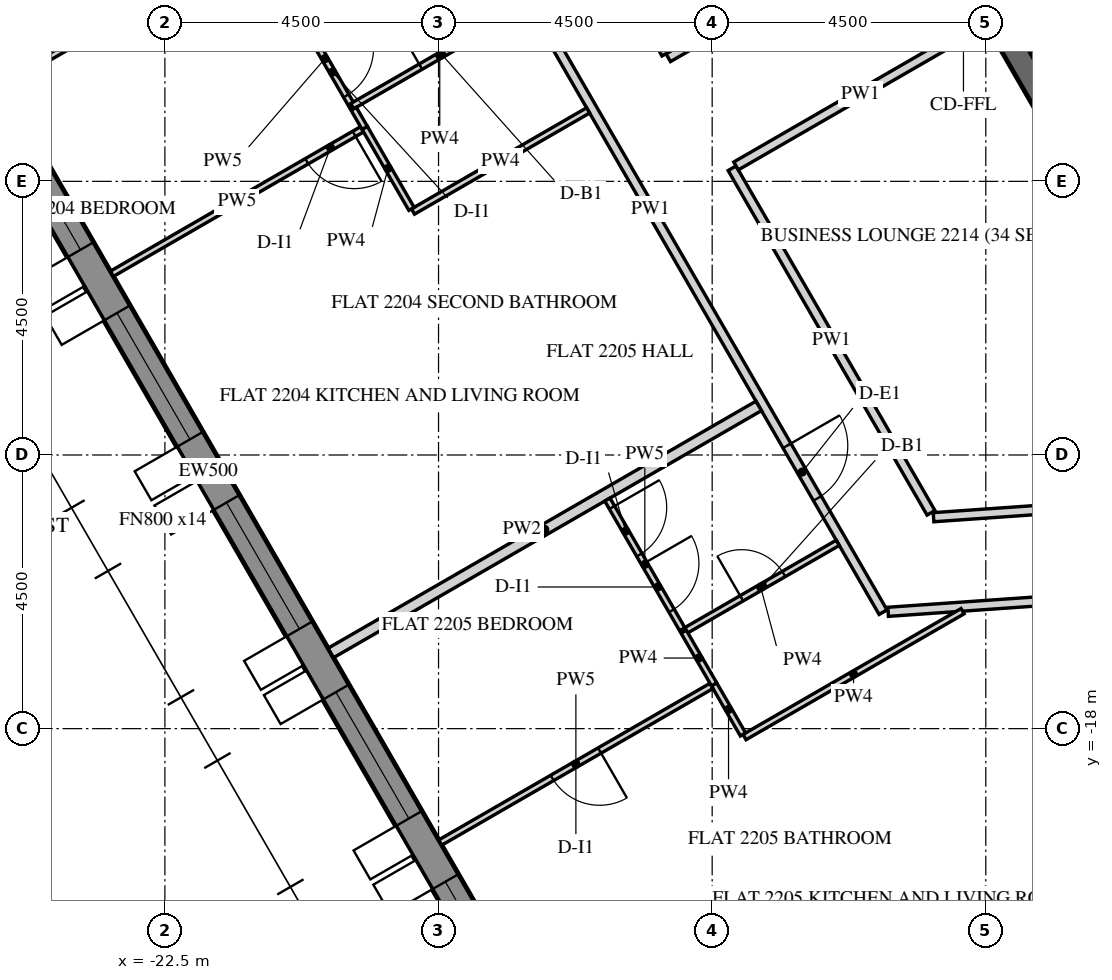
"""IFC4 building model, lengths in metres.
Left out: names, types, materials, properties, quantities, classifications, styles, units other than length and angle.
Written with IfcOpenShell. Run it as: python <this file> out.ifc"""

import sys

from ifc_helpers import new_model, si_unit, direction, frame, frame_2d, origin, place, context, subcontext, project, spatial, polyline, rectangle, outline, extrude, element, fill, save


model = new_model("IFC4")
c1 = context("Model", 3, precision=1e-05, world=origin(), true_north=direction((0.0, 1.0)))
c2 = subcontext(c1, "Body", "Model", "MODEL_VIEW")
j1 = project(units=[si_unit("LENGTHUNIT", "METRE"), si_unit("PLANEANGLEUNIT", "RADIAN")], contexts=[c1])
p1 = place(None, origin())
s1 = spatial("IfcSite", under=j1, at=p1, CompositionType="ELEMENT")
p2 = place(p1, origin())
s2 = spatial("IfcBuilding", under=s1, at=p2, CompositionType="ELEMENT")
p3 = place(p2, frame((0.0, 0.0, 279.6)))
s3 = spatial("IfcBuildingStorey", under=s2, at=p3, CompositionType="ELEMENT", Elevation=279.6)
p4 = place(p3, frame((-28.149, -2.745, -0.15), z_axis=(0.0, 0.0, 1.0), x_axis=(0.500003737743, -0.866023245787, 0.0)))
e1 = element("IfcWall", 1, at=p4, inside=s3, PredefinedType="SOLIDWALL", context=c2, shape_type="SweptSolid", body=[
    extrude(outline(polyline([(-0.021, -0.25), (25.468, -0.25), (25.421, 0.25), (0.021, 0.25), (-0.021, -0.25)])), origin(), (0.0, 0.0, 1.0), 3.9),
])
p5 = place(p4, frame((2.522, 0.0, 0.75)))
e2 = element("IfcOpeningElement", 2, at=p5, cuts=e1, PredefinedType="OPENING", context=c2, shape_type="SweptSolid", body=[
    extrude(rectangle(XDim=2.4, YDim=2.7, at=frame_2d((1.2, 1.35))), frame((0.0, 0.26, 0.0), z_axis=(0.0, -1.0, 0.0), x_axis=(1.0, 0.0, 0.0)), (0.0, 0.0, 1.0), 0.52),
])
p6 = place(p4, frame((6.122, 0.0, 0.75)))
e3 = element("IfcOpeningElement", 3, at=p6, cuts=e1, PredefinedType="OPENING", context=c2, shape_type="SweptSolid", body=[
    extrude(rectangle(XDim=2.4, YDim=2.7, at=frame_2d((1.2, 1.35))), frame((0.0, 0.26, 0.0), z_axis=(0.0, -1.0, 0.0), x_axis=(1.0, 0.0, 0.0)), (0.0, 0.0, 1.0), 0.52),
])
p7 = place(p4, frame((9.722, 0.0, 0.75)))
e4 = element("IfcOpeningElement", 4, at=p7, cuts=e1, PredefinedType="OPENING", context=c2, shape_type="SweptSolid", body=[
    extrude(rectangle(XDim=2.4, YDim=2.7, at=frame_2d((1.2, 1.35))), frame((0.0, 0.26, 0.0), z_axis=(0.0, -1.0, 0.0), x_axis=(1.0, 0.0, 0.0)), (0.0, 0.0, 1.0), 0.52),
])
p8 = place(p4, frame((13.323, 0.0, 0.75)))
e5 = element("IfcOpeningElement", 5, at=p8, cuts=e1, PredefinedType="OPENING", context=c2, shape_type="SweptSolid", body=[
    extrude(rectangle(XDim=2.4, YDim=2.7, at=frame_2d((1.2, 1.35))), frame((0.0, 0.26, 0.0), z_axis=(0.0, -1.0, 0.0), x_axis=(1.0, 0.0, 0.0)), (0.0, 0.0, 1.0), 0.52),
])
p9 = place(p4, frame((16.922, 0.0, 0.75)))
e6 = element("IfcOpeningElement", 6, at=p9, cuts=e1, PredefinedType="OPENING", context=c2, shape_type="SweptSolid", body=[
    extrude(rectangle(XDim=2.4, YDim=2.7, at=frame_2d((1.2, 1.35))), frame((0.0, 0.26, 0.0), z_axis=(0.0, -1.0, 0.0), x_axis=(1.0, 0.0, 0.0)), (0.0, 0.0, 1.0), 0.52),
])
p10 = place(p4, frame((20.522, 0.0, 0.75)))
e7 = element("IfcOpeningElement", 7, at=p10, cuts=e1, PredefinedType="OPENING", context=c2, shape_type="SweptSolid", body=[
    extrude(rectangle(XDim=2.4, YDim=2.7, at=frame_2d((1.2, 1.35))), frame((0.0, 0.26, 0.0), z_axis=(0.0, -1.0, 0.0), x_axis=(1.0, 0.0, 0.0)), (0.0, 0.0, 1.0), 0.52),
])
p11 = place(p3, frame((-12.471, 0.0, -0.15), z_axis=(0.0, 0.0, 1.0), x_axis=(0.499996419489, -0.866027470984, 0.0)))
e8 = element("IfcWall", 8, at=p11, inside=s3, PredefinedType="SHEAR", context=c2, shape_type="SweptSolid", body=[
    extrude(outline(polyline([(-0.115, -0.2), (12.586, -0.2), (12.355, 0.2), (0.115, 0.2), (-0.115, -0.2)])), origin(), (0.0, 0.0, 1.0), 3.9),
])
p12 = place(p11, frame((5.306, 0.0, 0.15)))
e9 = element("IfcOpeningElement", 9, at=p12, cuts=e8, PredefinedType="OPENING", context=c2, shape_type="SweptSolid", body=[
    extrude(rectangle(XDim=1.8, YDim=2.4, at=frame_2d((0.9, 1.2))), frame((0.0, 0.21, 0.0), z_axis=(0.0, -1.0, 0.0), x_axis=(1.0, 0.0, 0.0)), (0.0, 0.0, 1.0), 0.42),
])
p13 = place(p3, frame((-18.338, -2.838, 0.0), z_axis=(0.0, 0.0, 1.0), x_axis=(0.499999693481, -0.866025580753, 0.0)))
e10 = element("IfcWall", 10, at=p13, inside=s3, PredefinedType="PARTITIONING", context=c2, shape_type="SweptSolid", body=[
    extrude(rectangle(XDim=15.296, YDim=0.15, at=frame_2d((7.648, 0.0))), origin(), (0.0, 0.0, 1.0), 2.988),
])
p14 = place(p13, frame((2.325, 0.0, 0.0)))
e11 = element("IfcOpeningElement", 11, at=p14, cuts=e10, PredefinedType="OPENING", context=c2, shape_type="SweptSolid", body=[
    extrude(rectangle(XDim=1.0, YDim=2.1, at=frame_2d((0.5, 1.05))), frame((0.0, 0.085, 0.0), z_axis=(0.0, -1.0, 0.0), x_axis=(1.0, 0.0, 0.0)), (0.0, 0.0, 1.0), 0.17),
])
p15 = place(p13, frame((12.136, 0.0, 0.0)))
e12 = element("IfcOpeningElement", 12, at=p15, cuts=e10, PredefinedType="OPENING", context=c2, shape_type="SweptSolid", body=[
    extrude(rectangle(XDim=1.0, YDim=2.1, at=frame_2d((0.5, 1.05))), frame((0.0, 0.085, 0.0), z_axis=(0.0, -1.0, 0.0), x_axis=(1.0, 0.0, 0.0)), (0.0, 0.0, 1.0), 0.17),
])
p16 = place(p3, frame((-10.606, -16.079, 0.0), z_axis=(0.0, 0.0, 1.0), x_axis=(0.997563356349, 0.069766396426, 0.0)))
e13 = element("IfcWall", 13, at=p16, inside=s3, PredefinedType="PARTITIONING", context=c2, shape_type="SweptSolid", body=[
    extrude(rectangle(XDim=17.273, YDim=0.15, at=frame_2d((8.636, 0.0))), origin(), (0.0, 0.0, 1.0), 2.988),
])
p17 = place(p16, frame((3.877, 0.0, 0.0)))
e14 = element("IfcOpeningElement", 14, at=p17, cuts=e13, PredefinedType="OPENING", context=c2, shape_type="SweptSolid", body=[
    extrude(rectangle(XDim=1.0, YDim=2.1, at=frame_2d((0.5, 1.05))), frame((0.0, 0.085, 0.0), z_axis=(0.0, -1.0, 0.0), x_axis=(1.0, 0.0, 0.0)), (0.0, 0.0, 1.0), 0.17),
])
p18 = place(p3, frame((-10.066, -4.566, 0.0), z_axis=(0.0, 0.0, 1.0), x_axis=(-0.866037363387, -0.499979284789, 0.0)))
e15 = element("IfcWall", 15, at=p18, inside=s3, PredefinedType="PARTITIONING", context=c2, shape_type="SweptSolid", body=[
    extrude(rectangle(XDim=4.8, YDim=0.15, at=frame_2d((2.4, 0.0))), origin(), (0.0, 0.0, 1.0), 2.988),
])
p19 = place(p3, frame((-14.26, -6.901, 0.0), z_axis=(0.0, 0.0, 1.0), x_axis=(-0.499978899972, 0.866037585549, 0.0)))
e16 = element("IfcWall", 16, at=p19, inside=s3, PredefinedType="PARTITIONING", context=c2, shape_type="SweptSolid", body=[
    extrude(rectangle(XDim=4.835, YDim=0.15, at=frame_2d((2.417, 0.0))), origin(), (0.0, 0.0, 1.0), 2.988),
])
p20 = place(p19, frame((1.967, 0.0, 0.0)))
e17 = element("IfcOpeningElement", 17, at=p20, cuts=e16, PredefinedType="OPENING", context=c2, shape_type="SweptSolid", body=[
    extrude(rectangle(XDim=0.9, YDim=2.1, at=frame_2d((0.45, 1.05))), frame((0.0, 0.085, 0.0), z_axis=(0.0, -1.0, 0.0), x_axis=(1.0, 0.0, 0.0)), (0.0, 0.0, 1.0), 0.17),
])
p21 = place(p3, frame((7.051, -13.341, 0.0), z_axis=(0.0, 0.0, 1.0), x_axis=(-0.997563599815, -0.069762915103, 0.0)))
e18 = element("IfcWall", 18, at=p21, inside=s3, PredefinedType="PARTITIONING", context=c2, shape_type="SweptSolid", body=[
    extrude(rectangle(XDim=16.952, YDim=0.15, at=frame_2d((8.476, 0.0))), origin(), (0.0, 0.0, 1.0), 2.988),
])
p22 = place(p21, frame((8.026, 0.0, 0.0)))
e19 = element("IfcOpeningElement", 19, at=p22, cuts=e18, PredefinedType="OPENING", context=c2, shape_type="SweptSolid", body=[
    extrude(rectangle(XDim=0.9, YDim=2.1, at=frame_2d((0.45, 1.05))), frame((0.0, 0.085, 0.0), z_axis=(0.0, -1.0, 0.0), x_axis=(1.0, 0.0, 0.0)), (0.0, 0.0, 1.0), 0.17),
])
p23 = place(p3, frame((-9.901, -14.451, 0.0), z_axis=(0.0, 0.0, 1.0), x_axis=(-0.49999161165, 0.866030246746, 0.0)))
e20 = element("IfcWall", 20, at=p23, inside=s3, PredefinedType="PARTITIONING", context=c2, shape_type="SweptSolid", body=[
    extrude(rectangle(XDim=6.543, YDim=0.15, at=frame_2d((3.271, 0.0))), origin(), (0.0, 0.0, 1.0), 2.988),
])
p24 = place(p3, frame((-13.108, -8.747, 0.0), z_axis=(0.0, 0.0, 1.0), x_axis=(0.866024684746, 0.500001245408, 0.0)))
e21 = element("IfcWall", 21, at=p24, inside=s3, PredefinedType="PARTITIONING", context=c2, shape_type="SweptSolid", body=[
    extrude(rectangle(XDim=4.725, YDim=0.15, at=frame_2d((2.363, 0.0))), origin(), (0.0, 0.0, 1.0), 2.988),
])
p25 = place(p3, frame((-19.258, -8.145, 0.0), z_axis=(0.0, 0.0, 1.0), x_axis=(-0.866033238375, -0.499986429846, 0.0)))
e22 = element("IfcWall", 22, at=p25, inside=s3, PredefinedType="PARTITIONING", context=c2, shape_type="SweptSolid", body=[
    extrude(rectangle(XDim=4.75, YDim=0.1, at=frame_2d((2.375, 0.0))), origin(), (0.0, 0.0, 1.0), 2.988),
])
p26 = place(p25, frame((0.15, 0.0, 0.0)))
e23 = element("IfcOpeningElement", 23, at=p26, cuts=e22, PredefinedType="OPENING", context=c2, shape_type="SweptSolid", body=[
    extrude(rectangle(XDim=0.9, YDim=2.1, at=frame_2d((0.45, 1.05))), frame((0.0, 0.06, 0.0), z_axis=(0.0, -1.0, 0.0), x_axis=(1.0, 0.0, 0.0)), (0.0, 0.0, 1.0), 0.12),
])
p27 = place(p3, frame((-15.54, -7.833, 0.0), z_axis=(0.0, 0.0, 1.0), x_axis=(-0.866020521143, -0.500008456887, 0.0)))
e24 = element("IfcWall", 24, at=p27, inside=s3, PredefinedType="PARTITIONING", context=c2, shape_type="SweptSolid", body=[
    extrude(rectangle(XDim=3.325, YDim=0.1, at=frame_2d((1.663, 0.0))), origin(), (0.0, 0.0, 1.0), 2.988),
])
p28 = place(p3, frame((-18.445, -9.453, 0.0), z_axis=(0.0, 0.0, 1.0), x_axis=(-0.500024172624, 0.866011447264, 0.0)))
e25 = element("IfcWall", 25, at=p28, inside=s3, PredefinedType="PARTITIONING", context=c2, shape_type="SweptSolid", body=[
    extrude(rectangle(XDim=1.541, YDim=0.1, at=frame_2d((0.771, 0.0))), origin(), (0.0, 0.0, 1.0), 2.988),
])
p29 = place(p3, frame((-19.771, -16.755, 0.0), z_axis=(0.0, 0.0, 1.0), x_axis=(0.866022959057, 0.500004234368, 0.0)))
e26 = element("IfcWall", 26, at=p29, inside=s3, PredefinedType="PARTITIONING", context=c2, shape_type="SweptSolid", body=[
    extrude(rectangle(XDim=8.125, YDim=0.18, at=frame_2d((4.062, 0.0))), origin(), (0.0, 0.0, 1.0), 2.988),
])
p30 = place(p3, frame((-20.321, -6.203, 0.0), z_axis=(0.0, 0.0, 1.0), x_axis=(0.500054364951, -0.86599401389, 0.0)))
e27 = element("IfcWall", 27, at=p30, inside=s3, PredefinedType="PARTITIONING", context=c2, shape_type="SweptSolid", body=[
    extrude(rectangle(XDim=1.804, YDim=0.1, at=frame_2d((0.902, 0.0))), origin(), (0.0, 0.0, 1.0), 2.988),
])
p31 = place(p30, frame((0.704, 0.0, 0.0)))
e28 = element("IfcOpeningElement", 28, at=p31, cuts=e27, PredefinedType="OPENING", context=c2, shape_type="SweptSolid", body=[
    extrude(rectangle(XDim=0.9, YDim=2.1, at=frame_2d((0.45, 1.05))), frame((0.0, 0.06, 0.0), z_axis=(0.0, -1.0, 0.0), x_axis=(1.0, 0.0, 0.0)), (0.0, 0.0, 1.0), 0.12),
])
p32 = place(p3, frame((-19.42, -7.764, 0.0), z_axis=(0.0, 0.0, 1.0), x_axis=(0.866002163101, 0.500040251884, 0.0)))
e29 = element("IfcWall", 29, at=p32, inside=s3, PredefinedType="PARTITIONING", context=c2, shape_type="SweptSolid", body=[
    extrude(rectangle(XDim=3.325, YDim=0.1, at=frame_2d((1.663, 0.0))), origin(), (0.0, 0.0, 1.0), 2.988),
])
p33 = place(p32, frame((1.3, 0.0, 0.0)))
e30 = element("IfcOpeningElement", 30, at=p33, cuts=e29, PredefinedType="OPENING", context=c2, shape_type="SweptSolid", body=[
    extrude(rectangle(XDim=0.8, YDim=2.1, at=frame_2d((0.4, 1.05))), frame((0.0, 0.06, 0.0), z_axis=(0.0, -1.0, 0.0), x_axis=(1.0, 0.0, 0.0)), (0.0, 0.0, 1.0), 0.12),
])
p34 = place(p3, frame((-25.171, -7.402, 0.0), z_axis=(0.0, 0.0, 1.0), x_axis=(0.866020389056, 0.500008685663, 0.0)))
e31 = element("IfcWall", 31, at=p34, inside=s3, PredefinedType="PARTITIONING", context=c2, shape_type="SweptSolid", body=[
    extrude(rectangle(XDim=4.75, YDim=0.1, at=frame_2d((2.375, 0.0))), origin(), (0.0, 0.0, 1.0), 2.988),
])
p35 = place(p34, frame((3.7, 0.0, 0.0)))
e32 = element("IfcOpeningElement", 32, at=p35, cuts=e31, PredefinedType="OPENING", context=c2, shape_type="SweptSolid", body=[
    extrude(rectangle(XDim=0.9, YDim=2.1, at=frame_2d((0.45, 1.05))), frame((0.0, 0.06, 0.0), z_axis=(0.0, -1.0, 0.0), x_axis=(1.0, 0.0, 0.0)), (0.0, 0.0, 1.0), 0.12),
])
p36 = place(p3, frame((-19.213, -8.122, 0.0), z_axis=(0.0, 0.0, 1.0), x_axis=(-0.499683639304, 0.866207977689, 0.0)))
e33 = element("IfcWall", 33, at=p36, inside=s3, PredefinedType="PARTITIONING", context=c2, shape_type="SweptSolid", body=[
    extrude(rectangle(XDim=0.363, YDim=0.1, at=frame_2d((0.182, 0.0))), origin(), (0.0, 0.0, 1.0), 2.988),
])
p37 = place(p3, frame((-9.382, -16.069, 0.0), z_axis=(0.0, 0.0, 1.0), x_axis=(-0.866028486751, -0.499994660107, 0.0)))
e34 = element("IfcWall", 34, at=p37, inside=s3, PredefinedType="PARTITIONING", context=c2, shape_type="SweptSolid", body=[
    extrude(rectangle(XDim=4.141, YDim=0.1, at=frame_2d((2.07, 0.0))), origin(), (0.0, 0.0, 1.0), 2.988),
])
p38 = place(p3, frame((-12.993, -18.096, 0.0), z_axis=(0.0, 0.0, 1.0), x_axis=(-0.500055416838, 0.865993406494, 0.0)))
e35 = element("IfcWall", 35, at=p38, inside=s3, PredefinedType="PARTITIONING", context=c2, shape_type="SweptSolid", body=[
    extrude(rectangle(XDim=0.952, YDim=0.1, at=frame_2d((0.476, 0.0))), origin(), (0.0, 0.0, 1.0), 2.988),
])
p39 = place(p3, frame((-13.511, -17.298, 0.0), z_axis=(0.0, 0.0, 1.0), x_axis=(-0.866026116456, -0.499998765615, 0.0)))
e36 = element("IfcWall", 36, at=p39, inside=s3, PredefinedType="PARTITIONING", context=c2, shape_type="SweptSolid", body=[
    extrude(rectangle(XDim=5.15, YDim=0.1, at=frame_2d((2.575, 0.0))), origin(), (0.0, 0.0, 1.0), 2.988),
])
p40 = place(p39, frame((2.125, 0.0, 0.0)))
e37 = element("IfcOpeningElement", 37, at=p40, cuts=e36, PredefinedType="OPENING", context=c2, shape_type="SweptSolid", body=[
    extrude(rectangle(XDim=0.9, YDim=2.1, at=frame_2d((0.45, 1.05))), frame((0.0, 0.06, 0.0), z_axis=(0.0, -1.0, 0.0), x_axis=(1.0, 0.0, 0.0)), (0.0, 0.0, 1.0), 0.12),
])
p41 = place(p3, frame((-13.968, -16.407, 0.0), z_axis=(0.0, 0.0, 1.0), x_axis=(0.866046596414, 0.499963291492, 0.0)))
e38 = element("IfcWall", 38, at=p41, inside=s3, PredefinedType="PARTITIONING", context=c2, shape_type="SweptSolid", body=[
    extrude(rectangle(XDim=2.925, YDim=0.1, at=frame_2d((1.462, 0.0))), origin(), (0.0, 0.0, 1.0), 2.988),
])
p42 = place(p41, frame((1.1, 0.0, 0.0)))
e39 = element("IfcOpeningElement", 39, at=p42, cuts=e38, PredefinedType="OPENING", context=c2, shape_type="SweptSolid", body=[
    extrude(rectangle(XDim=0.8, YDim=2.1, at=frame_2d((0.4, 1.05))), frame((0.0, 0.06, 0.0), z_axis=(0.0, -1.0, 0.0), x_axis=(1.0, 0.0, 0.0)), (0.0, 0.0, 1.0), 0.12),
])
p43 = place(p3, frame((-15.223, -14.233, 0.0), z_axis=(0.0, 0.0, 1.0), x_axis=(0.500000007376, -0.866025399526, 0.0)))
e40 = element("IfcWall", 40, at=p43, inside=s3, PredefinedType="PARTITIONING", context=c2, shape_type="SweptSolid", body=[
    extrude(rectangle(XDim=2.462, YDim=0.1, at=frame_2d((1.231, 0.0))), origin(), (0.0, 0.0, 1.0), 2.988),
])
p44 = place(p43, frame((0.15, 0.0, 0.0)))
e41 = element("IfcOpeningElement", 41, at=p44, cuts=e40, PredefinedType="OPENING", context=c2, shape_type="SweptSolid", body=[
    extrude(rectangle(XDim=0.9, YDim=2.1, at=frame_2d((0.45, 1.05))), frame((0.0, 0.06, 0.0), z_axis=(0.0, -1.0, 0.0), x_axis=(1.0, 0.0, 0.0)), (0.0, 0.0, 1.0), 0.12),
])
p45 = place(p43, frame((1.21, 0.0, 0.0)))
e42 = element("IfcOpeningElement", 42, at=p45, cuts=e40, PredefinedType="OPENING", context=c2, shape_type="SweptSolid", body=[
    extrude(rectangle(XDim=0.9, YDim=2.1, at=frame_2d((0.45, 1.05))), frame((0.0, 0.06, 0.0), z_axis=(0.0, -1.0, 0.0), x_axis=(1.0, 0.0, 0.0)), (0.0, 0.0, 1.0), 0.12),
])
p46 = place(p3, frame((-13.969, -16.405, 0.0), z_axis=(0.0, 0.0, 1.0), x_axis=(0.499912255713, -0.866076057046, 0.0)))
e43 = element("IfcWall", 43, at=p46, inside=s3, PredefinedType="PARTITIONING", context=c2, shape_type="SweptSolid", body=[
    extrude(rectangle(XDim=1.002, YDim=0.1, at=frame_2d((0.501, 0.0))), origin(), (0.0, 0.0, 1.0), 2.988),
])
p47 = place(p6, frame((0.0, 0.18, 0.0)))
e44 = element("IfcWindow", 44, at=p47, inside=s3, PartitioningType="DOUBLE_PANEL_VERTICAL", PredefinedType="WINDOW", context=c2, shape_type="SweptSolid", body=[
    extrude(rectangle(XDim=2.4, YDim=2.7, at=frame_2d((1.2, 1.35))), frame((0.0, 0.03, 0.0), z_axis=(0.0, -1.0, 0.0), x_axis=(1.0, 0.0, 0.0)), (0.0, 0.0, 1.0), 0.06),
])
fill(e3, e44)
p48 = place(p7, frame((0.0, 0.18, 0.0)))
e45 = element("IfcWindow", 45, at=p48, inside=s3, PartitioningType="DOUBLE_PANEL_VERTICAL", PredefinedType="WINDOW", context=c2, shape_type="SweptSolid", body=[
    extrude(rectangle(XDim=2.4, YDim=2.7, at=frame_2d((1.2, 1.35))), frame((0.0, 0.03, 0.0), z_axis=(0.0, -1.0, 0.0), x_axis=(1.0, 0.0, 0.0)), (0.0, 0.0, 1.0), 0.06),
])
fill(e4, e45)
p49 = place(p8, frame((0.0, 0.18, 0.0)))
e46 = element("IfcWindow", 46, at=p49, inside=s3, PartitioningType="DOUBLE_PANEL_VERTICAL", PredefinedType="WINDOW", context=c2, shape_type="SweptSolid", body=[
    extrude(rectangle(XDim=2.4, YDim=2.7, at=frame_2d((1.2, 1.35))), frame((0.0, 0.03, 0.0), z_axis=(0.0, -1.0, 0.0), x_axis=(1.0, 0.0, 0.0)), (0.0, 0.0, 1.0), 0.06),
])
fill(e5, e46)
p50 = place(p9, frame((0.0, 0.18, 0.0)))
e47 = element("IfcWindow", 47, at=p50, inside=s3, PartitioningType="DOUBLE_PANEL_VERTICAL", PredefinedType="WINDOW", context=c2, shape_type="SweptSolid", body=[
    extrude(rectangle(XDim=2.4, YDim=2.7, at=frame_2d((1.2, 1.35))), frame((0.0, 0.03, 0.0), z_axis=(0.0, -1.0, 0.0), x_axis=(1.0, 0.0, 0.0)), (0.0, 0.0, 1.0), 0.06),
])
fill(e6, e47)
p51 = place(p10, frame((0.0, 0.18, 0.0)))
e48 = element("IfcWindow", 48, at=p51, inside=s3, PartitioningType="DOUBLE_PANEL_VERTICAL", PredefinedType="WINDOW", context=c2, shape_type="SweptSolid", body=[
    extrude(rectangle(XDim=2.4, YDim=2.7, at=frame_2d((1.2, 1.35))), frame((0.0, 0.03, 0.0), z_axis=(0.0, -1.0, 0.0), x_axis=(1.0, 0.0, 0.0)), (0.0, 0.0, 1.0), 0.06),
])
fill(e7, e48)
p52 = place(p31, origin())
e49 = element("IfcDoor", 49, at=p52, inside=s3, OperationType="SINGLE_SWING_RIGHT", PredefinedType="DOOR", context=c2, shape_type="SweptSolid", body=[
    extrude(rectangle(XDim=0.9, YDim=2.1, at=frame_2d((0.45, 1.05))), frame((0.0, 0.025, 0.0), z_axis=(0.0, -1.0, 0.0), x_axis=(1.0, 0.0, 0.0)), (0.0, 0.0, 1.0), 0.05),
])
fill(e28, e49)
p53 = place(p26, origin())
e50 = element("IfcDoor", 50, at=p53, inside=s3, OperationType="SINGLE_SWING_RIGHT", PredefinedType="DOOR", context=c2, shape_type="SweptSolid", body=[
    extrude(rectangle(XDim=0.9, YDim=2.1, at=frame_2d((0.45, 1.05))), frame((0.0, 0.025, 0.0), z_axis=(0.0, -1.0, 0.0), x_axis=(1.0, 0.0, 0.0)), (0.0, 0.0, 1.0), 0.05),
])
fill(e23, e50)
p54 = place(p33, origin())
e51 = element("IfcDoor", 51, at=p54, inside=s3, OperationType="SINGLE_SWING_LEFT", PredefinedType="DOOR", context=c2, shape_type="SweptSolid", body=[
    extrude(rectangle(XDim=0.8, YDim=2.1, at=frame_2d((0.4, 1.05))), frame((0.0, 0.025, 0.0), z_axis=(0.0, -1.0, 0.0), x_axis=(1.0, 0.0, 0.0)), (0.0, 0.0, 1.0), 0.05),
])
fill(e30, e51)
p55 = place(p15, origin())
e52 = element("IfcDoor", 52, at=p55, inside=s3, OperationType="SINGLE_SWING_RIGHT", PredefinedType="DOOR", context=c2, shape_type="SweptSolid", body=[
    extrude(rectangle(XDim=1.0, YDim=2.1, at=frame_2d((0.5, 1.05))), frame((0.0, 0.025, 0.0), z_axis=(0.0, -1.0, 0.0), x_axis=(1.0, 0.0, 0.0)), (0.0, 0.0, 1.0), 0.05),
])
fill(e12, e52)
p56 = place(p42, origin())
e53 = element("IfcDoor", 53, at=p56, inside=s3, OperationType="SINGLE_SWING_LEFT", PredefinedType="DOOR", context=c2, shape_type="SweptSolid", body=[
    extrude(rectangle(XDim=0.8, YDim=2.1, at=frame_2d((0.4, 1.05))), frame((0.0, 0.025, 0.0), z_axis=(0.0, -1.0, 0.0), x_axis=(1.0, 0.0, 0.0)), (0.0, 0.0, 1.0), 0.05),
])
fill(e39, e53)
p57 = place(p44, origin())
e54 = element("IfcDoor", 54, at=p57, inside=s3, OperationType="SINGLE_SWING_LEFT", PredefinedType="DOOR", context=c2, shape_type="SweptSolid", body=[
    extrude(rectangle(XDim=0.9, YDim=2.1, at=frame_2d((0.45, 1.05))), frame((0.0, 0.025, 0.0), z_axis=(0.0, -1.0, 0.0), x_axis=(1.0, 0.0, 0.0)), (0.0, 0.0, 1.0), 0.05),
])
fill(e41, e54)
p58 = place(p45, origin())
e55 = element("IfcDoor", 55, at=p58, inside=s3, OperationType="SINGLE_SWING_LEFT", PredefinedType="DOOR", context=c2, shape_type="SweptSolid", body=[
    extrude(rectangle(XDim=0.9, YDim=2.1, at=frame_2d((0.45, 1.05))), frame((0.0, 0.025, 0.0), z_axis=(0.0, -1.0, 0.0), x_axis=(1.0, 0.0, 0.0)), (0.0, 0.0, 1.0), 0.05),
])
fill(e42, e55)
p59 = place(p40, origin())
e56 = element("IfcDoor", 56, at=p59, inside=s3, OperationType="SINGLE_SWING_RIGHT", PredefinedType="DOOR", context=c2, shape_type="SweptSolid", body=[
    extrude(rectangle(XDim=0.9, YDim=2.1, at=frame_2d((0.45, 1.05))), frame((0.0, 0.025, 0.0), z_axis=(0.0, -1.0, 0.0), x_axis=(1.0, 0.0, 0.0)), (0.0, 0.0, 1.0), 0.05),
])
fill(e37, e56)
save(model, sys.argv[1])
